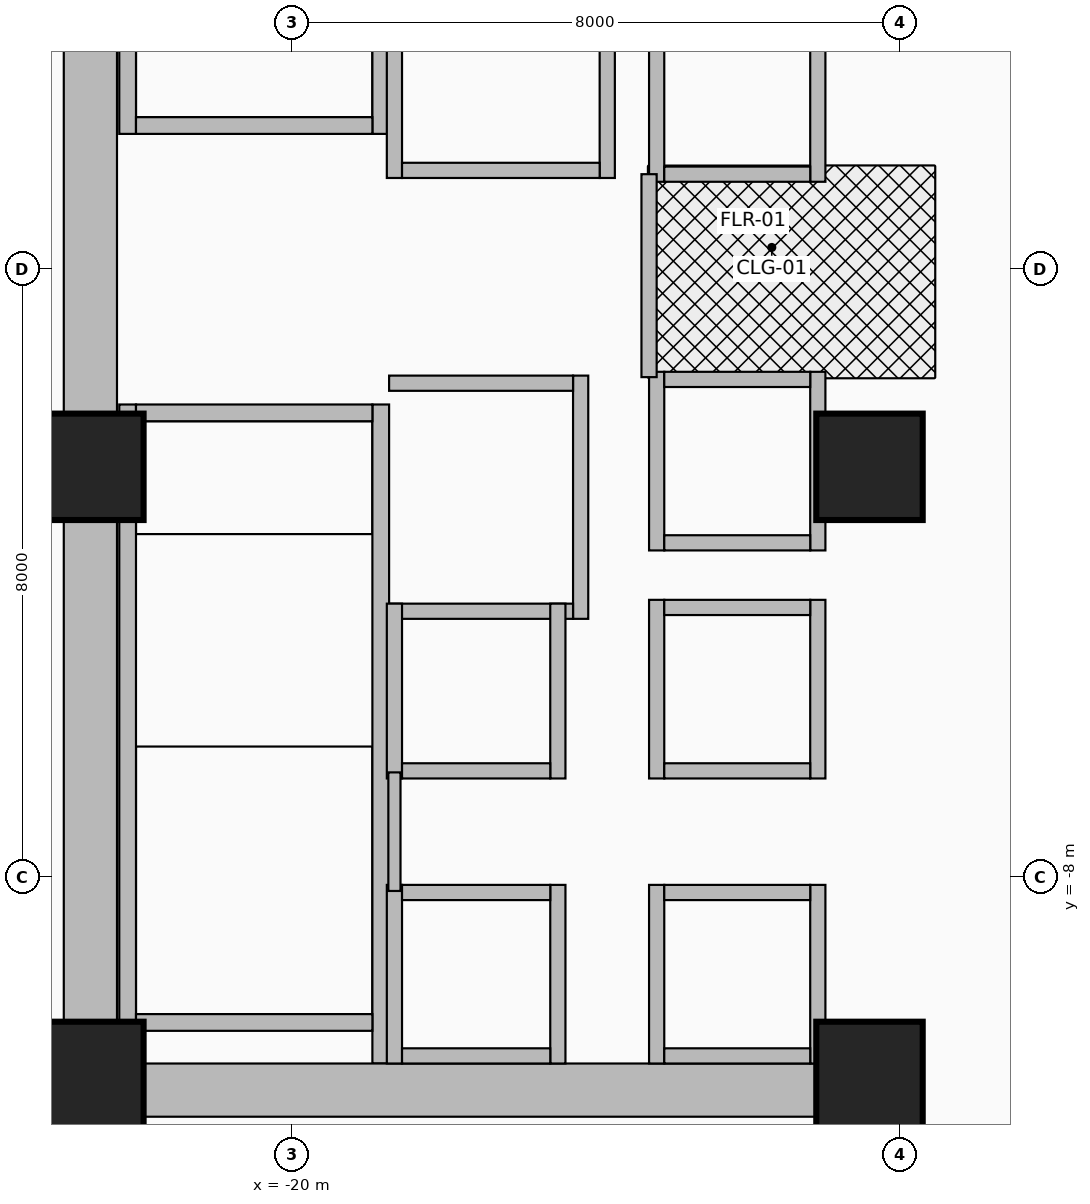
"""IFC4 building model, lengths in metres.
Left out: names, types, materials, properties, quantities, classifications, styles, units other than length and angle.
Written with IfcOpenShell. Run it as: python <this file> out.ifc"""

import sys

from ifc_helpers import new_model, si_unit, direction, frame, frame_2d, origin, origin_2d, place, context, subcontext, project, spatial, rectangle, extrude, source, transform, mapped, element, fill, save


model = new_model("IFC4")
c1 = context("Model", 3, precision=1e-05, world=origin(), true_north=direction((0.0, 1.0)))
c2 = subcontext(c1, "Body", "Model", "MODEL_VIEW")
j1 = project(units=[si_unit("LENGTHUNIT", "METRE"), si_unit("PLANEANGLEUNIT", "RADIAN")], contexts=[c1])
p1 = place(None, origin())
s1 = spatial("IfcSite", under=j1, at=p1, CompositionType="ELEMENT")
p2 = place(p1, origin())
s2 = spatial("IfcBuilding", under=s1, at=p2, CompositionType="ELEMENT")
p3 = place(p2, frame((0.0, 0.0, 26.0)))
s3 = spatial("IfcBuildingStorey", under=s2, at=p3, CompositionType="ELEMENT", Elevation=26.0)
for number, where, z_axis, x_axis in (
    (1, (-22.16, 1.78, 0.0), (0.0, 0.0, 1.0), (0.0, 1.0, 0.0)),
    (2, (-18.83, 1.78, 0.0), (0.0, 0.0, 1.0), (0.0, 1.0, 0.0)),
):
    element("IfcWall", number, at=place(p3, frame(where, z_axis=z_axis, x_axis=x_axis)), inside=s3, PredefinedType="SHEAR", context=c2, shape_type="SweptSolid", body=[
        extrude(rectangle(XDim=8.67, YDim=0.22, at=frame_2d((4.335, 0.0))), origin(), (0.0, 0.0, 1.0), 3.46),
    ])
p4 = place(p3, frame((-22.05, 1.89, 0.0), z_axis=(0.0, 0.0, 1.0), x_axis=(1.0, 0.0, 0.0)))
e3 = element("IfcWall", 3, at=p4, inside=s3, PredefinedType="SHEAR", context=c2, shape_type="SweptSolid", body=[
    extrude(rectangle(XDim=3.11, YDim=0.22, at=frame_2d((1.555, 0.0))), origin(), (0.0, 0.0, 1.0), 3.46),
])
p5 = place(p4, frame((1.0, 0.0, 0.0)))
e4 = element("IfcOpeningElement", 4, at=p5, cuts=e3, PredefinedType="OPENING", context=c2, shape_type="SweptSolid", body=[
    extrude(rectangle(XDim=1.1, YDim=2.15, at=frame_2d((0.55, 1.075))), frame((0.0, 0.125, 0.0), z_axis=(0.0, -1.0, 0.0), x_axis=(1.0, 0.0, 0.0)), (0.0, 0.0, 1.0), 0.25),
])
for number, where, z_axis, x_axis in (
    (5, (-22.16, -10.45, 0.0), (0.0, 0.0, 1.0), (0.0, 1.0, 0.0)),
    (6, (-18.83, -10.45, 0.0), (0.0, 0.0, 1.0), (0.0, 1.0, 0.0)),
):
    element("IfcWall", number, at=place(p3, frame(where, z_axis=z_axis, x_axis=x_axis)), inside=s3, PredefinedType="SHEAR", context=c2, shape_type="SweptSolid", body=[
        extrude(rectangle(XDim=8.67, YDim=0.22, at=frame_2d((4.335, 0.0))), origin(), (0.0, 0.0, 1.0), 3.46),
    ])
p6 = place(p3, frame((-22.05, -9.91, 0.0), z_axis=(0.0, 0.0, 1.0), x_axis=(1.0, 0.0, 0.0)))
e7 = element("IfcWall", 7, at=p6, inside=s3, PredefinedType="SHEAR", context=c2, shape_type="SweptSolid", body=[
    extrude(rectangle(XDim=3.11, YDim=0.22, at=frame_2d((1.555, 0.0))), origin(), (0.0, 0.0, 1.0), 3.46),
])
p7 = place(p3, frame((-22.05, -1.89, 0.0), z_axis=(0.0, 0.0, 1.0), x_axis=(1.0, 0.0, 0.0)))
e8 = element("IfcWall", 8, at=p7, inside=s3, PredefinedType="SHEAR", context=c2, shape_type="SweptSolid", body=[
    extrude(rectangle(XDim=3.11, YDim=0.22, at=frame_2d((1.555, 0.0))), origin(), (0.0, 0.0, 1.0), 3.46),
])
p8 = place(p7, frame((1.0, 0.0, 0.0)))
e9 = element("IfcOpeningElement", 9, at=p8, cuts=e8, PredefinedType="OPENING", context=c2, shape_type="SweptSolid", body=[
    extrude(rectangle(XDim=1.1, YDim=2.15, at=frame_2d((0.55, 1.075))), frame((0.0, 0.125, 0.0), z_axis=(0.0, -1.0, 0.0), x_axis=(1.0, 0.0, 0.0)), (0.0, 0.0, 1.0), 0.25),
])
p9 = place(p3, frame((-22.65, -11.15, 0.0), z_axis=(0.0, 0.0, 1.0), x_axis=(0.0, 1.0, 0.0)))
e10 = element("IfcWall", 10, at=p9, inside=s3, PredefinedType="SHEAR", context=c2, shape_type="SweptSolid", body=[
    extrude(rectangle(XDim=22.3, YDim=0.7, at=frame_2d((11.15, 0.0))), origin(), (0.0, 0.0, 1.0), 3.46),
])
p10 = place(p3, frame((-22.65, -10.8, 0.0), z_axis=(0.0, 0.0, 1.0), x_axis=(1.0, 0.0, 0.0)))
e11 = element("IfcWall", 11, at=p10, inside=s3, PredefinedType="SHEAR", context=c2, shape_type="SweptSolid", body=[
    extrude(rectangle(XDim=10.25, YDim=0.7, at=frame_2d((5.125, 0.0))), origin(), (0.0, 0.0, 1.0), 3.46),
])
m1 = source(origin(), c2, "Body", "SweptSolid", [
    extrude(rectangle(XDim=1.4, YDim=1.4, at=origin_2d()), origin(), (0.0, 0.0, 1.0), 3.7),
])
for number, where, z_axis, x_axis in (
    (12, (-22.65, -10.6, 0.0), (0.0, 0.0, 1.0), (1.0, 0.0, 0.0)),
    (13, (-12.4, -10.6, 0.0), (0.0, 0.0, 1.0), (1.0, 0.0, 0.0)),
    (14, (-22.65, -2.6, 0.0), (0.0, 0.0, 1.0), (1.0, 0.0, 0.0)),
    (15, (-12.4, -2.6, 0.0), (0.0, 0.0, 1.0), (1.0, 0.0, 0.0)),
):
    element("IfcColumn", number, at=place(p3, frame(where, z_axis=z_axis, x_axis=x_axis)), inside=s3, PredefinedType="COLUMN", context=c2, shape_type="MappedRepresentation", body=[
        mapped(m1, transform((0.0, 0.0, 0.0), x_axis=(1.0, 0.0, 0.0), y_axis=(0.0, 1.0, 0.0), z_axis=(0.0, 0.0, 1.0), scale=1.0)),
    ])
for number, where, z_axis, x_axis in (
    (16, (-18.65, 1.2, 0.0), (0.0, 0.0, 1.0), (0.0, 1.0, 0.0)),
    (17, (-15.85, 1.2, 0.0), (0.0, 0.0, 1.0), (0.0, 1.0, 0.0)),
):
    element("IfcWall", number, at=place(p3, frame(where, z_axis=z_axis, x_axis=x_axis)), inside=s3, PredefinedType="MOVABLE", context=c2, shape_type="SweptSolid", body=[
        extrude(rectangle(XDim=3.225, YDim=0.2, at=frame_2d((1.613, 0.0))), origin(), (0.0, 0.0, 1.0), 3.46),
    ])
p11 = place(p3, frame((-18.55, 1.3, 0.0), z_axis=(0.0, 0.0, 1.0), x_axis=(1.0, 0.0, 0.0)))
e18 = element("IfcWall", 18, at=p11, inside=s3, PredefinedType="MOVABLE", context=c2, shape_type="SweptSolid", body=[
    extrude(rectangle(XDim=2.6, YDim=0.2, at=frame_2d((1.3, 0.0))), origin(), (0.0, 0.0, 1.0), 3.46),
])
p12 = place(p11, frame((0.7, 0.0, 0.0)))
e19 = element("IfcOpeningElement", 19, at=p12, cuts=e18, PredefinedType="OPENING", context=c2, shape_type="SweptSolid", body=[
    extrude(rectangle(XDim=1.2, YDim=2.1, at=frame_2d((0.6, 1.05))), frame((0.0, 0.115, 0.0), z_axis=(0.0, -1.0, 0.0), x_axis=(1.0, 0.0, 0.0)), (0.0, 0.0, 1.0), 0.23),
])
p13 = place(p3, frame((-16.2, -4.6, 0.0), z_axis=(0.0, 0.0, 1.0), x_axis=(0.0, 1.0, 0.0)))
e20 = element("IfcWall", 20, at=p13, inside=s3, PredefinedType="MOVABLE", context=c2, shape_type="SweptSolid", body=[
    extrude(rectangle(XDim=3.2, YDim=0.2, at=frame_2d((1.6, 0.0))), origin(), (0.0, 0.0, 1.0), 3.46),
])
p14 = place(p3, frame((-18.72, -4.5, 0.0), z_axis=(0.0, 0.0, 1.0), x_axis=(1.0, 0.0, 0.0)))
e21 = element("IfcWall", 21, at=p14, inside=s3, PredefinedType="MOVABLE", context=c2, shape_type="SweptSolid", body=[
    extrude(rectangle(XDim=2.42, YDim=0.2, at=frame_2d((1.21, 0.0))), origin(), (0.0, 0.0, 1.0), 3.46),
])
p15 = place(p3, frame((-18.72, -1.5, 0.0), z_axis=(0.0, 0.0, 1.0), x_axis=(1.0, 0.0, 0.0)))
e22 = element("IfcWall", 22, at=p15, inside=s3, PredefinedType="MOVABLE", context=c2, shape_type="SweptSolid", body=[
    extrude(rectangle(XDim=2.42, YDim=0.2, at=frame_2d((1.21, 0.0))), origin(), (0.0, 0.0, 1.0), 3.46),
])
p16 = place(p15, frame((0.61, 0.0, 0.0)))
e23 = element("IfcOpeningElement", 23, at=p16, cuts=e22, PredefinedType="OPENING", context=c2, shape_type="SweptSolid", body=[
    extrude(rectangle(XDim=1.2, YDim=2.1, at=frame_2d((0.6, 1.05))), frame((0.0, 0.115, 0.0), z_axis=(0.0, -1.0, 0.0), x_axis=(1.0, 0.0, 0.0)), (0.0, 0.0, 1.0), 0.23),
])
for number, where, z_axis, x_axis in (
    (24, (-15.2, -10.45, 0.0), (0.0, 0.0, 1.0), (0.0, 1.0, 0.0)),
    (25, (-13.08, -10.45, 0.0), (0.0, 0.0, 1.0), (0.0, 1.0, 0.0)),
):
    element("IfcWall", number, at=place(p3, frame(where, z_axis=z_axis, x_axis=x_axis)), inside=s3, PredefinedType="MOVABLE", context=c2, shape_type="SweptSolid", body=[
        extrude(rectangle(XDim=2.35, YDim=0.2, at=frame_2d((1.175, 0.0))), origin(), (0.0, 0.0, 1.0), 2.583),
    ])
p17 = place(p3, frame((-15.1, -10.35, 0.0), z_axis=(0.0, 0.0, 1.0), x_axis=(1.0, 0.0, 0.0)))
e26 = element("IfcWall", 26, at=p17, inside=s3, PredefinedType="MOVABLE", context=c2, shape_type="SweptSolid", body=[
    extrude(rectangle(XDim=1.92, YDim=0.2, at=frame_2d((0.96, 0.0))), origin(), (0.0, 0.0, 1.0), 2.583),
])
p18 = place(p3, frame((-15.1, -8.2, 0.0), z_axis=(0.0, 0.0, 1.0), x_axis=(1.0, 0.0, 0.0)))
e27 = element("IfcWall", 27, at=p18, inside=s3, PredefinedType="MOVABLE", context=c2, shape_type="SweptSolid", body=[
    extrude(rectangle(XDim=1.92, YDim=0.2, at=frame_2d((0.96, 0.0))), origin(), (0.0, 0.0, 1.0), 3.46),
])
p19 = place(p18, frame((0.41, 0.0, 0.0)))
e28 = element("IfcOpeningElement", 28, at=p19, cuts=e27, PredefinedType="OPENING", context=c2, shape_type="SweptSolid", body=[
    extrude(rectangle(XDim=1.1, YDim=2.1, at=frame_2d((0.55, 1.05))), frame((0.0, 0.115, 0.0), z_axis=(0.0, -1.0, 0.0), x_axis=(1.0, 0.0, 0.0)), (0.0, 0.0, 1.0), 0.23),
])
for number, where, z_axis, x_axis in (
    (29, (-15.2, -6.7, 0.0), (0.0, 0.0, 1.0), (0.0, 1.0, 0.0)),
    (30, (-13.08, -6.7, 0.0), (0.0, 0.0, 1.0), (0.0, 1.0, 0.0)),
):
    element("IfcWall", number, at=place(p3, frame(where, z_axis=z_axis, x_axis=x_axis)), inside=s3, PredefinedType="MOVABLE", context=c2, shape_type="SweptSolid", body=[
        extrude(rectangle(XDim=2.35, YDim=0.2, at=frame_2d((1.175, 0.0))), origin(), (0.0, 0.0, 1.0), 3.46),
    ])
p20 = place(p3, frame((-15.1, -6.6, 0.0), z_axis=(0.0, 0.0, 1.0), x_axis=(1.0, 0.0, 0.0)))
e31 = element("IfcWall", 31, at=p20, inside=s3, PredefinedType="MOVABLE", context=c2, shape_type="SweptSolid", body=[
    extrude(rectangle(XDim=1.92, YDim=0.2, at=frame_2d((0.96, 0.0))), origin(), (0.0, 0.0, 1.0), 3.46),
])
p21 = place(p20, frame((0.41, 0.0, 0.0)))
e32 = element("IfcOpeningElement", 32, at=p21, cuts=e31, PredefinedType="OPENING", context=c2, shape_type="SweptSolid", body=[
    extrude(rectangle(XDim=1.1, YDim=2.1, at=frame_2d((0.55, 1.05))), frame((0.0, 0.115, 0.0), z_axis=(0.0, -1.0, 0.0), x_axis=(1.0, 0.0, 0.0)), (0.0, 0.0, 1.0), 0.23),
])
p22 = place(p3, frame((-15.1, -4.45, 0.0), z_axis=(0.0, 0.0, 1.0), x_axis=(1.0, 0.0, 0.0)))
e33 = element("IfcWall", 33, at=p22, inside=s3, PredefinedType="MOVABLE", context=c2, shape_type="SweptSolid", body=[
    extrude(rectangle(XDim=1.92, YDim=0.2, at=frame_2d((0.96, 0.0))), origin(), (0.0, 0.0, 1.0), 3.46),
])
for number, where, z_axis, x_axis in (
    (34, (-18.65, -10.45, 0.0), (0.0, 0.0, 1.0), (0.0, 1.0, 0.0)),
    (35, (-16.5, -10.45, 0.0), (0.0, 0.0, 1.0), (0.0, 1.0, 0.0)),
):
    element("IfcWall", number, at=place(p3, frame(where, z_axis=z_axis, x_axis=x_axis)), inside=s3, PredefinedType="MOVABLE", context=c2, shape_type="SweptSolid", body=[
        extrude(rectangle(XDim=2.35, YDim=0.2, at=frame_2d((1.175, 0.0))), origin(), (0.0, 0.0, 1.0), 2.583),
    ])
p23 = place(p3, frame((-18.55, -10.35, 0.0), z_axis=(0.0, 0.0, 1.0), x_axis=(1.0, 0.0, 0.0)))
e36 = element("IfcWall", 36, at=p23, inside=s3, PredefinedType="MOVABLE", context=c2, shape_type="SweptSolid", body=[
    extrude(rectangle(XDim=1.95, YDim=0.2, at=frame_2d((0.975, 0.0))), origin(), (0.0, 0.0, 1.0), 2.583),
])
p24 = place(p3, frame((-18.55, -8.2, 0.0), z_axis=(0.0, 0.0, 1.0), x_axis=(1.0, 0.0, 0.0)))
e37 = element("IfcWall", 37, at=p24, inside=s3, PredefinedType="MOVABLE", context=c2, shape_type="SweptSolid", body=[
    extrude(rectangle(XDim=1.95, YDim=0.2, at=frame_2d((0.975, 0.0))), origin(), (0.0, 0.0, 1.0), 3.46),
])
for number, where, z_axis, x_axis in (
    (38, (-15.2, 1.15, 0.0), (0.0, 0.0, 1.0), (0.0, 1.0, 0.0)),
    (39, (-13.08, 1.15, 0.0), (0.0, 0.0, 1.0), (0.0, 1.0, 0.0)),
):
    element("IfcWall", number, at=place(p3, frame(where, z_axis=z_axis, x_axis=x_axis)), inside=s3, PredefinedType="MOVABLE", context=c2, shape_type="SweptSolid", body=[
        extrude(rectangle(XDim=2.25, YDim=0.2, at=frame_2d((1.125, 0.0))), origin(), (0.0, 0.0, 1.0), 3.46),
    ])
p25 = place(p3, frame((-15.1, 1.25, 0.0), z_axis=(0.0, 0.0, 1.0), x_axis=(1.0, 0.0, 0.0)))
e40 = element("IfcWall", 40, at=p25, inside=s3, PredefinedType="MOVABLE", context=c2, shape_type="SweptSolid", body=[
    extrude(rectangle(XDim=1.92, YDim=0.2, at=frame_2d((0.96, 0.0))), origin(), (0.0, 0.0, 1.0), 3.46),
])
for number, where, z_axis, x_axis in (
    (41, (-18.65, -6.7, 0.0), (0.0, 0.0, 1.0), (0.0, 1.0, 0.0)),
    (42, (-16.5, -6.7, 0.0), (0.0, 0.0, 1.0), (0.0, 1.0, 0.0)),
):
    element("IfcWall", number, at=place(p3, frame(where, z_axis=z_axis, x_axis=x_axis)), inside=s3, PredefinedType="MOVABLE", context=c2, shape_type="SweptSolid", body=[
        extrude(rectangle(XDim=2.3, YDim=0.2, at=frame_2d((1.15, 0.0))), origin(), (0.0, 0.0, 1.0), 3.46),
    ])
p26 = place(p3, frame((-18.55, -6.6, 0.0), z_axis=(0.0, 0.0, 1.0), x_axis=(1.0, 0.0, 0.0)))
e43 = element("IfcWall", 43, at=p26, inside=s3, PredefinedType="MOVABLE", context=c2, shape_type="SweptSolid", body=[
    extrude(rectangle(XDim=1.95, YDim=0.2, at=frame_2d((0.975, 0.0))), origin(), (0.0, 0.0, 1.0), 3.46),
])
for number, where, z_axis, x_axis in (
    (44, (-15.2, -3.7, 0.0), (0.0, 0.0, 1.0), (0.0, 1.0, 0.0)),
    (45, (-13.08, -3.7, 0.0), (0.0, 0.0, 1.0), (0.0, 1.0, 0.0)),
):
    element("IfcWall", number, at=place(p3, frame(where, z_axis=z_axis, x_axis=x_axis)), inside=s3, PredefinedType="MOVABLE", context=c2, shape_type="SweptSolid", body=[
        extrude(rectangle(XDim=2.35, YDim=0.2, at=frame_2d((1.175, 0.0))), origin(), (0.0, 0.0, 1.0), 3.46),
    ])
for number, where, z_axis, x_axis in (
    (46, (-15.1, -3.6, 0.0), (0.0, 0.0, 1.0), (1.0, 0.0, 0.0)),
    (47, (-15.1, -1.45, 0.0), (0.0, 0.0, 1.0), (1.0, 0.0, 0.0)),
):
    element("IfcWall", number, at=place(p3, frame(where, z_axis=z_axis, x_axis=x_axis)), inside=s3, PredefinedType="MOVABLE", context=c2, shape_type="SweptSolid", body=[
        extrude(rectangle(XDim=1.92, YDim=0.2, at=frame_2d((0.96, 0.0))), origin(), (0.0, 0.0, 1.0), 3.46),
    ])
p27 = place(p3, frame((-15.3, -1.42, 0.0), z_axis=(0.0, 0.0, 1.0), x_axis=(0.0, 1.0, 0.0)))
e48 = element("IfcWall", 48, at=p27, inside=s3, PredefinedType="PARTITIONING", context=c2, shape_type="SweptSolid", body=[
    extrude(rectangle(XDim=2.67, YDim=0.2, at=frame_2d((1.335, 0.0))), origin(), (0.0, 0.0, 1.0), 3.46),
])
p28 = place(p27, frame((0.78, 0.0, 0.0)))
e49 = element("IfcOpeningElement", 49, at=p28, cuts=e48, PredefinedType="OPENING", context=c2, shape_type="SweptSolid", body=[
    extrude(rectangle(XDim=1.05, YDim=2.15, at=frame_2d((0.525, 1.075))), frame((0.0, 0.115, 0.0), z_axis=(0.0, -1.0, 0.0), x_axis=(1.0, 0.0, 0.0)), (0.0, 0.0, 1.0), 0.23),
])
p29 = place(p3, frame((-18.65, -8.18, 0.0), z_axis=(0.0, 0.0, 1.0), x_axis=(0.0, 1.0, 0.0)))
e50 = element("IfcWall", 50, at=p29, inside=s3, PredefinedType="PARTITIONING", context=c2, shape_type="SweptSolid", body=[
    extrude(rectangle(XDim=1.56, YDim=0.16, at=frame_2d((0.78, 0.0))), origin(), (0.0, 0.0, 1.0), 3.46),
])
p30 = place(p12, origin())
e51 = element("IfcDoor", 51, at=p30, inside=s3, OperationType="DOUBLE_DOOR_SLIDING", PredefinedType="DOOR", context=c2, shape_type="SweptSolid", body=[
    extrude(rectangle(XDim=1.2, YDim=2.1, at=frame_2d((0.6, 1.05))), frame((0.0, 0.025, 0.0), z_axis=(0.0, -1.0, 0.0), x_axis=(1.0, 0.0, 0.0)), (0.0, 0.0, 1.0), 0.05),
])
fill(e19, e51)
p31 = place(p16, origin())
e52 = element("IfcDoor", 52, at=p31, inside=s3, OperationType="DOUBLE_DOOR_SLIDING", PredefinedType="DOOR", context=c2, shape_type="SweptSolid", body=[
    extrude(rectangle(XDim=1.2, YDim=2.1, at=frame_2d((0.6, 1.05))), frame((0.0, 0.025, 0.0), z_axis=(0.0, -1.0, 0.0), x_axis=(1.0, 0.0, 0.0)), (0.0, 0.0, 1.0), 0.05),
])
fill(e23, e52)
p32 = place(p19, origin())
e53 = element("IfcDoor", 53, at=p32, inside=s3, OperationType="DOUBLE_DOOR_SLIDING", PredefinedType="DOOR", context=c2, shape_type="SweptSolid", body=[
    extrude(rectangle(XDim=1.1, YDim=2.1, at=frame_2d((0.55, 1.05))), frame((0.0, 0.025, 0.0), z_axis=(0.0, -1.0, 0.0), x_axis=(1.0, 0.0, 0.0)), (0.0, 0.0, 1.0), 0.05),
])
fill(e28, e53)
p33 = place(p21, origin())
e54 = element("IfcDoor", 54, at=p33, inside=s3, OperationType="DOUBLE_DOOR_SLIDING", PredefinedType="DOOR", context=c2, shape_type="SweptSolid", body=[
    extrude(rectangle(XDim=1.1, YDim=2.1, at=frame_2d((0.55, 1.05))), frame((0.0, 0.025, 0.0), z_axis=(0.0, -1.0, 0.0), x_axis=(1.0, 0.0, 0.0)), (0.0, 0.0, 1.0), 0.05),
])
fill(e32, e54)
p34 = place(p28, origin())
e55 = element("IfcDoor", 55, at=p34, inside=s3, OperationType="SINGLE_SWING_RIGHT", PredefinedType="DOOR", context=c2, shape_type="SweptSolid", body=[
    extrude(rectangle(XDim=1.05, YDim=2.15, at=frame_2d((0.525, 1.075))), frame((0.0, 0.025, 0.0), z_axis=(0.0, -1.0, 0.0), x_axis=(1.0, 0.0, 0.0)), (0.0, 0.0, 1.0), 0.05),
])
fill(e49, e55)
p35 = place(p5, frame((1.1, 0.0, 0.0), z_axis=(0.0, 0.0, 1.0), x_axis=(-1.0, 0.0, 0.0)))
e56 = element("IfcDoor", 56, at=p35, inside=s3, OperationType="SINGLE_SWING_LEFT", PredefinedType="DOOR", context=c2, shape_type="SweptSolid", body=[
    extrude(rectangle(XDim=1.1, YDim=2.15, at=frame_2d((0.55, 1.075))), frame((0.0, 0.025, 0.0), z_axis=(0.0, -1.0, 0.0), x_axis=(1.0, 0.0, 0.0)), (0.0, 0.0, 1.0), 0.05),
])
fill(e4, e56)
p36 = place(p8, origin())
e57 = element("IfcDoor", 57, at=p36, inside=s3, OperationType="SINGLE_SWING_RIGHT", PredefinedType="DOOR", context=c2, shape_type="SweptSolid", body=[
    extrude(rectangle(XDim=1.1, YDim=2.15, at=frame_2d((0.55, 1.075))), frame((0.0, 0.025, 0.0), z_axis=(0.0, -1.0, 0.0), x_axis=(1.0, 0.0, 0.0)), (0.0, 0.0, 1.0), 0.05),
])
fill(e9, e57)
save(model, sys.argv[1])
